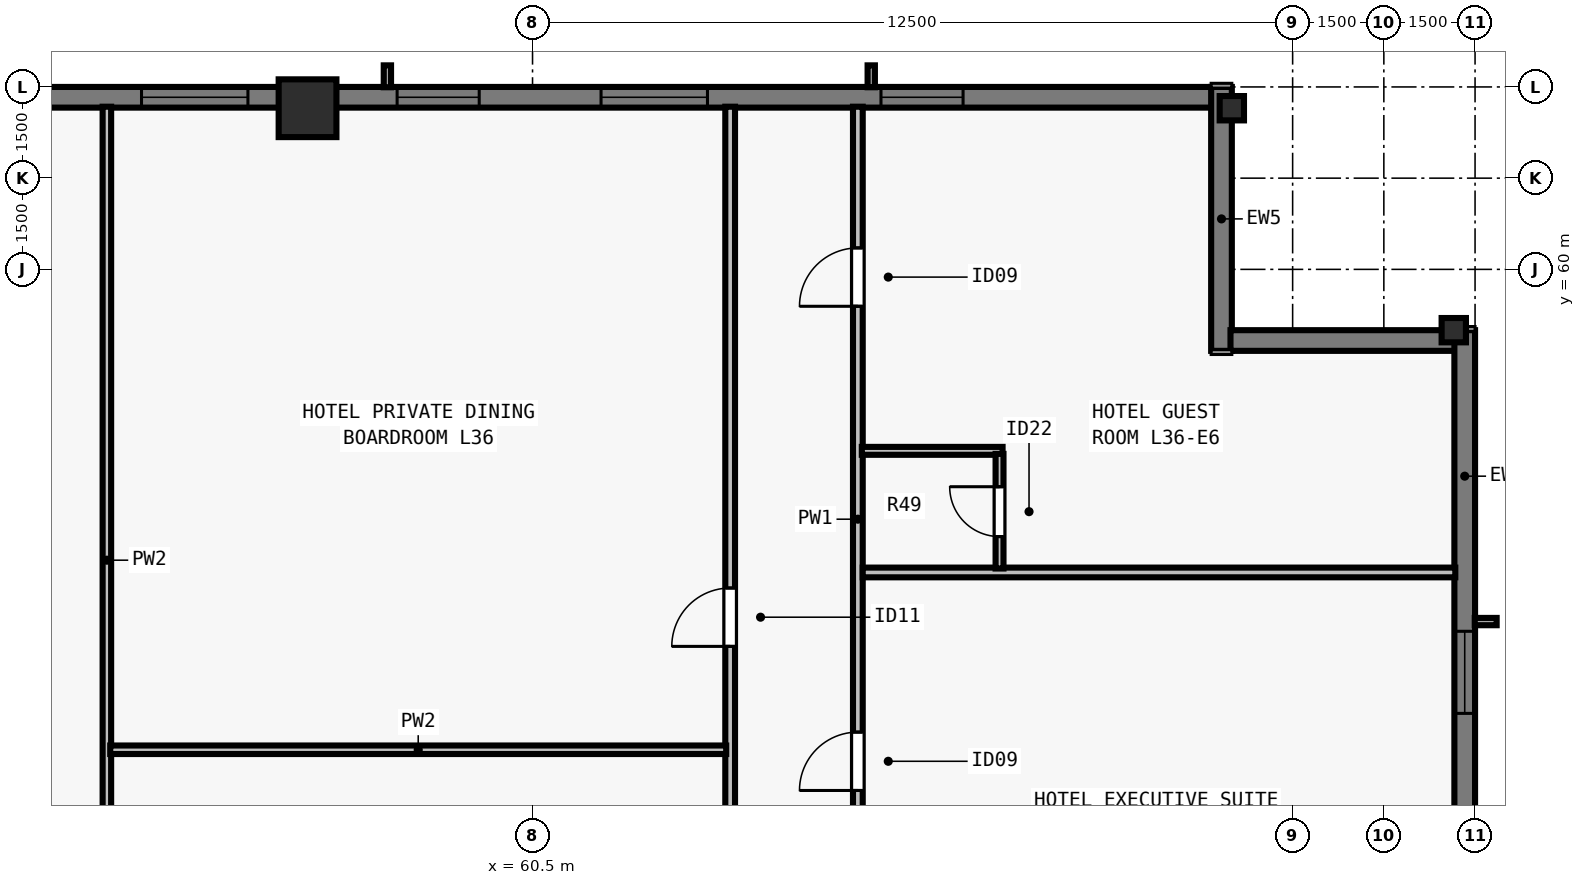
"""IFC4 building model, lengths in metres.
Left out: names, types, materials, properties, quantities, classifications, styles, units other than length and angle.
Written with IfcOpenShell. Run it as: python <this file> out.ifc"""

import sys

from ifc_helpers import new_model, si_unit, direction, frame, frame_2d, origin, origin_2d, place, context, subcontext, project, spatial, rectangle, i_section, extrude, element, fill, save


model = new_model("IFC4")
c1 = context("Model", 3, precision=1e-05, world=origin(), true_north=direction((0.0, 1.0)))
c2 = subcontext(c1, "Body", "Model", "MODEL_VIEW")
j1 = project(units=[si_unit("LENGTHUNIT", "METRE"), si_unit("PLANEANGLEUNIT", "RADIAN")], contexts=[c1])
p1 = place(None, origin())
s1 = spatial("IfcSite", under=j1, at=p1, CompositionType="ELEMENT")
p2 = place(p1, origin())
s2 = spatial("IfcBuilding", under=s1, at=p2, CompositionType="ELEMENT")
p3 = place(p2, frame((0.0, 0.0, 134.0)))
s3 = spatial("IfcBuildingStorey", under=s2, at=p3, CompositionType="ELEMENT", Elevation=134.0)
for number, where, z_axis, x_axis in (
    (1, (75.65, 59.0, 0.0), (0.0, 0.0, 1.0), (0.0, 1.0, 0.0)),
    (2, (72.0, 62.65, 0.0), (0.0, 0.0, 1.0), (1.0, 0.0, 0.0)),
):
    element("IfcColumn", number, at=place(p3, frame(where, z_axis=z_axis, x_axis=x_axis)), inside=s3, PredefinedType="COLUMN", context=c2, shape_type="SweptSolid", body=[
        extrude(i_section(OverallWidth=0.4, OverallDepth=0.4, WebThickness=0.022, FlangeThickness=0.036, at=origin_2d()), origin(), (0.0, 0.0, 1.0), 3.5),
    ])
p4 = place(p3, frame((56.8, 62.65, 0.0), z_axis=(0.0, 0.0, 1.0), x_axis=(1.0, 0.0, 0.0)))
e3 = element("IfcColumn", 3, at=p4, inside=s3, PredefinedType="COLUMN", context=c2, shape_type="SweptSolid", body=[
    extrude(rectangle(XDim=0.95, YDim=0.95, at=origin_2d()), origin(), (0.0, 0.0, 1.0), 3.5),
])
p5 = place(p3, frame((32.0, 62.83, 0.0), z_axis=(0.0, 0.0, 1.0), x_axis=(1.0, 0.0, 0.0)))
e4 = element("IfcWall", 4, at=p5, inside=s3, PredefinedType="SOLIDWALL", context=c2, shape_type="SweptSolid", body=[
    extrude(rectangle(XDim=39.682, YDim=0.34, at=frame_2d((19.841, 0.0))), origin(), (0.0, 0.0, 1.0), 3.28),
])
p6 = place(p5, frame((4.952, 0.0, 0.8)))
e5 = element("IfcOpeningElement", 5, at=p6, cuts=e4, PredefinedType="OPENING", context=c2, shape_type="SweptSolid", body=[
    extrude(rectangle(XDim=1.35, YDim=1.66, at=frame_2d((0.675, 0.83))), frame((0.0, 0.18, 0.0), z_axis=(0.0, -1.0, 0.0), x_axis=(1.0, 0.0, 0.0)), (0.0, 0.0, 1.0), 0.36),
])
p7 = place(p5, frame((12.059, 0.0, 0.8)))
e6 = element("IfcOpeningElement", 6, at=p7, cuts=e4, PredefinedType="OPENING", context=c2, shape_type="SweptSolid", body=[
    extrude(rectangle(XDim=1.35, YDim=1.66, at=frame_2d((0.675, 0.83))), frame((0.0, 0.18, 0.0), z_axis=(0.0, -1.0, 0.0), x_axis=(1.0, 0.0, 0.0)), (0.0, 0.0, 1.0), 0.36),
])
p8 = place(p5, frame((16.262, 0.0, 0.8)))
e7 = element("IfcOpeningElement", 7, at=p8, cuts=e4, PredefinedType="OPENING", context=c2, shape_type="SweptSolid", body=[
    extrude(rectangle(XDim=1.75, YDim=1.66, at=frame_2d((0.875, 0.83))), frame((0.0, 0.18, 0.0), z_axis=(0.0, -1.0, 0.0), x_axis=(1.0, 0.0, 0.0)), (0.0, 0.0, 1.0), 0.36),
])
p9 = place(p5, frame((19.166, 0.0, 0.8)))
e8 = element("IfcOpeningElement", 8, at=p9, cuts=e4, PredefinedType="OPENING", context=c2, shape_type="SweptSolid", body=[
    extrude(rectangle(XDim=1.35, YDim=1.66, at=frame_2d((0.675, 0.83))), frame((0.0, 0.18, 0.0), z_axis=(0.0, -1.0, 0.0), x_axis=(1.0, 0.0, 0.0)), (0.0, 0.0, 1.0), 0.36),
])
p10 = place(p5, frame((22.07, 0.0, 0.8)))
e9 = element("IfcOpeningElement", 9, at=p10, cuts=e4, PredefinedType="OPENING", context=c2, shape_type="SweptSolid", body=[
    extrude(rectangle(XDim=1.75, YDim=1.66, at=frame_2d((0.875, 0.83))), frame((0.0, 0.18, 0.0), z_axis=(0.0, -1.0, 0.0), x_axis=(1.0, 0.0, 0.0)), (0.0, 0.0, 1.0), 0.36),
])
p11 = place(p5, frame((26.273, 0.0, 0.8)))
e10 = element("IfcOpeningElement", 10, at=p11, cuts=e4, PredefinedType="OPENING", context=c2, shape_type="SweptSolid", body=[
    extrude(rectangle(XDim=1.35, YDim=1.66, at=frame_2d((0.675, 0.83))), frame((0.0, 0.18, 0.0), z_axis=(0.0, -1.0, 0.0), x_axis=(1.0, 0.0, 0.0)), (0.0, 0.0, 1.0), 0.36),
])
p12 = place(p5, frame((29.627, 0.0, 0.8)))
e11 = element("IfcOpeningElement", 11, at=p12, cuts=e4, PredefinedType="OPENING", context=c2, shape_type="SweptSolid", body=[
    extrude(rectangle(XDim=1.75, YDim=1.66, at=frame_2d((0.875, 0.83))), frame((0.0, 0.18, 0.0), z_axis=(0.0, -1.0, 0.0), x_axis=(1.0, 0.0, 0.0)), (0.0, 0.0, 1.0), 0.36),
])
p13 = place(p5, frame((34.23, 0.0, 0.8)))
e12 = element("IfcOpeningElement", 12, at=p13, cuts=e4, PredefinedType="OPENING", context=c2, shape_type="SweptSolid", body=[
    extrude(rectangle(XDim=1.35, YDim=1.66, at=frame_2d((0.675, 0.83))), frame((0.0, 0.18, 0.0), z_axis=(0.0, -1.0, 0.0), x_axis=(1.0, 0.0, 0.0)), (0.0, 0.0, 1.0), 0.36),
])
p14 = place(p3, frame((71.83, 63.0, 0.0), z_axis=(0.0, 0.0, 1.0), x_axis=(0.0, -1.0, 0.0)))
e13 = element("IfcWall", 13, at=p14, inside=s3, PredefinedType="SOLIDWALL", context=c2, shape_type="SweptSolid", body=[
    extrude(rectangle(XDim=4.34, YDim=0.34, at=frame_2d((2.17, 0.0))), origin(), (0.0, 0.0, 1.0), 3.28),
])
p15 = place(p3, frame((71.978, 58.83, 0.0), z_axis=(0.0, 0.0, 1.0), x_axis=(1.0, 0.0, 0.0)))
e14 = element("IfcWall", 14, at=p15, inside=s3, PredefinedType="SOLIDWALL", context=c2, shape_type="SweptSolid", body=[
    extrude(rectangle(XDim=3.704, YDim=0.34, at=frame_2d((1.852, 0.0))), origin(), (0.0, 0.0, 1.0), 3.28),
])
p16 = place(p3, frame((75.83, 59.0, 0.0), z_axis=(0.0, 0.0, 1.0), x_axis=(0.0, -1.0, 0.0)))
e15 = element("IfcWall", 15, at=p16, inside=s3, PredefinedType="SOLIDWALL", context=c2, shape_type="SweptSolid", body=[
    extrude(rectangle(XDim=39.682, YDim=0.34, at=frame_2d((19.841, 0.0))), origin(), (0.0, 0.0, 1.0), 3.28),
])
p17 = place(p16, frame((4.952, 0.0, 0.8)))
e16 = element("IfcOpeningElement", 16, at=p17, cuts=e15, PredefinedType="OPENING", context=c2, shape_type="SweptSolid", body=[
    extrude(rectangle(XDim=1.35, YDim=1.66, at=frame_2d((0.675, 0.83))), frame((0.0, 0.18, 0.0), z_axis=(0.0, -1.0, 0.0), x_axis=(1.0, 0.0, 0.0)), (0.0, 0.0, 1.0), 0.36),
])
p18 = place(p16, frame((8.305, 0.0, 0.8)))
e17 = element("IfcOpeningElement", 17, at=p18, cuts=e15, PredefinedType="OPENING", context=c2, shape_type="SweptSolid", body=[
    extrude(rectangle(XDim=1.75, YDim=1.66, at=frame_2d((0.875, 0.83))), frame((0.0, 0.18, 0.0), z_axis=(0.0, -1.0, 0.0), x_axis=(1.0, 0.0, 0.0)), (0.0, 0.0, 1.0), 0.36),
])
p19 = place(p16, frame((12.909, 0.0, 0.8)))
e18 = element("IfcOpeningElement", 18, at=p19, cuts=e15, PredefinedType="OPENING", context=c2, shape_type="SweptSolid", body=[
    extrude(rectangle(XDim=1.35, YDim=1.66, at=frame_2d((0.675, 0.83))), frame((0.0, 0.18, 0.0), z_axis=(0.0, -1.0, 0.0), x_axis=(1.0, 0.0, 0.0)), (0.0, 0.0, 1.0), 0.36),
])
p20 = place(p16, frame((16.262, 0.0, 0.8)))
e19 = element("IfcOpeningElement", 19, at=p20, cuts=e15, PredefinedType="OPENING", context=c2, shape_type="SweptSolid", body=[
    extrude(rectangle(XDim=1.75, YDim=1.66, at=frame_2d((0.875, 0.83))), frame((0.0, 0.18, 0.0), z_axis=(0.0, -1.0, 0.0), x_axis=(1.0, 0.0, 0.0)), (0.0, 0.0, 1.0), 0.36),
])
p21 = place(p16, frame((20.016, 0.0, 0.8)))
e20 = element("IfcOpeningElement", 20, at=p21, cuts=e15, PredefinedType="OPENING", context=c2, shape_type="SweptSolid", body=[
    extrude(rectangle(XDim=1.35, YDim=1.66, at=frame_2d((0.675, 0.83))), frame((0.0, 0.18, 0.0), z_axis=(0.0, -1.0, 0.0), x_axis=(1.0, 0.0, 0.0)), (0.0, 0.0, 1.0), 0.36),
])
p22 = place(p16, frame((22.07, 0.0, 0.8)))
e21 = element("IfcOpeningElement", 21, at=p22, cuts=e15, PredefinedType="OPENING", context=c2, shape_type="SweptSolid", body=[
    extrude(rectangle(XDim=1.75, YDim=1.66, at=frame_2d((0.875, 0.83))), frame((0.0, 0.18, 0.0), z_axis=(0.0, -1.0, 0.0), x_axis=(1.0, 0.0, 0.0)), (0.0, 0.0, 1.0), 0.36),
])
p23 = place(p16, frame((26.273, 0.0, 0.8)))
e22 = element("IfcOpeningElement", 22, at=p23, cuts=e15, PredefinedType="OPENING", context=c2, shape_type="SweptSolid", body=[
    extrude(rectangle(XDim=1.35, YDim=1.66, at=frame_2d((0.675, 0.83))), frame((0.0, 0.18, 0.0), z_axis=(0.0, -1.0, 0.0), x_axis=(1.0, 0.0, 0.0)), (0.0, 0.0, 1.0), 0.36),
])
p24 = place(p16, frame((29.627, 0.0, 0.8)))
e23 = element("IfcOpeningElement", 23, at=p24, cuts=e15, PredefinedType="OPENING", context=c2, shape_type="SweptSolid", body=[
    extrude(rectangle(XDim=1.75, YDim=1.66, at=frame_2d((0.875, 0.83))), frame((0.0, 0.18, 0.0), z_axis=(0.0, -1.0, 0.0), x_axis=(1.0, 0.0, 0.0)), (0.0, 0.0, 1.0), 0.36),
])
p25 = place(p16, frame((33.38, 0.0, 0.8)))
e24 = element("IfcOpeningElement", 24, at=p25, cuts=e15, PredefinedType="OPENING", context=c2, shape_type="SweptSolid", body=[
    extrude(rectangle(XDim=1.35, YDim=1.66, at=frame_2d((0.675, 0.83))), frame((0.0, 0.18, 0.0), z_axis=(0.0, -1.0, 0.0), x_axis=(1.0, 0.0, 0.0)), (0.0, 0.0, 1.0), 0.36),
])
p26 = place(p16, frame((35.83, 0.0, 0.8)))
e25 = element("IfcOpeningElement", 25, at=p26, cuts=e15, PredefinedType="OPENING", context=c2, shape_type="SweptSolid", body=[
    extrude(rectangle(XDim=0.9, YDim=1.66, at=frame_2d((0.45, 0.83))), frame((0.0, 0.18, 0.0), z_axis=(0.0, -1.0, 0.0), x_axis=(1.0, 0.0, 0.0)), (0.0, 0.0, 1.0), 0.36),
])
p27 = place(p3, frame((65.85, 15.325, 0.0), z_axis=(0.0, 0.0, 1.0), x_axis=(0.0, 1.0, 0.0)))
e26 = element("IfcWall", 26, at=p27, inside=s3, PredefinedType="PARTITIONING", context=c2, shape_type="SweptSolid", body=[
    extrude(rectangle(XDim=47.35, YDim=0.16, at=frame_2d((23.675, 0.0))), origin(), (0.0, 0.0, 1.0), 2.555),
])
p28 = place(p27, frame((4.993, 0.0, 0.0)))
e27 = element("IfcOpeningElement", 27, at=p28, cuts=e26, PredefinedType="OPENING", context=c2, shape_type="SweptSolid", body=[
    extrude(rectangle(XDim=0.96, YDim=2.15, at=frame_2d((0.48, 1.075))), frame((0.0, 0.09, 0.0), z_axis=(0.0, -1.0, 0.0), x_axis=(1.0, 0.0, 0.0)), (0.0, 0.0, 1.0), 0.18),
])
p29 = place(p27, frame((12.525, 0.0, 0.0)))
e28 = element("IfcOpeningElement", 28, at=p29, cuts=e26, PredefinedType="OPENING", context=c2, shape_type="SweptSolid", body=[
    extrude(rectangle(XDim=0.96, YDim=2.15, at=frame_2d((0.48, 1.075))), frame((0.0, 0.09, 0.0), z_axis=(0.0, -1.0, 0.0), x_axis=(1.0, 0.0, 0.0)), (0.0, 0.0, 1.0), 0.18),
])
p30 = place(p27, frame((20.385, 0.0, 0.0)))
e29 = element("IfcOpeningElement", 29, at=p30, cuts=e26, PredefinedType="OPENING", context=c2, shape_type="SweptSolid", body=[
    extrude(rectangle(XDim=0.96, YDim=2.15, at=frame_2d((0.48, 1.075))), frame((0.0, 0.09, 0.0), z_axis=(0.0, -1.0, 0.0), x_axis=(1.0, 0.0, 0.0)), (0.0, 0.0, 1.0), 0.18),
])
p31 = place(p27, frame((28.246, 0.0, 0.0)))
e30 = element("IfcOpeningElement", 30, at=p31, cuts=e26, PredefinedType="OPENING", context=c2, shape_type="SweptSolid", body=[
    extrude(rectangle(XDim=0.96, YDim=2.15, at=frame_2d((0.48, 1.075))), frame((0.0, 0.09, 0.0), z_axis=(0.0, -1.0, 0.0), x_axis=(1.0, 0.0, 0.0)), (0.0, 0.0, 1.0), 0.18),
])
p32 = place(p27, frame((36.105, 0.0, 0.0)))
e31 = element("IfcOpeningElement", 31, at=p32, cuts=e26, PredefinedType="OPENING", context=c2, shape_type="SweptSolid", body=[
    extrude(rectangle(XDim=0.96, YDim=2.15, at=frame_2d((0.48, 1.075))), frame((0.0, 0.09, 0.0), z_axis=(0.0, -1.0, 0.0), x_axis=(1.0, 0.0, 0.0)), (0.0, 0.0, 1.0), 0.18),
])
p33 = place(p27, frame((44.068, 0.0, 0.0)))
e32 = element("IfcOpeningElement", 32, at=p33, cuts=e26, PredefinedType="OPENING", context=c2, shape_type="SweptSolid", body=[
    extrude(rectangle(XDim=0.96, YDim=2.15, at=frame_2d((0.48, 1.075))), frame((0.0, 0.09, 0.0), z_axis=(0.0, -1.0, 0.0), x_axis=(1.0, 0.0, 0.0)), (0.0, 0.0, 1.0), 0.18),
])
p34 = place(p3, frame((63.75, 47.6, 0.0), z_axis=(0.0, 0.0, 1.0), x_axis=(0.0, 1.0, 0.0)))
e33 = element("IfcWall", 33, at=p34, inside=s3, PredefinedType="PARTITIONING", context=c2, shape_type="SweptSolid", body=[
    extrude(rectangle(XDim=15.075, YDim=0.16, at=frame_2d((7.538, 0.0))), origin(), (0.0, 0.0, 1.0), 2.555),
])
p35 = place(p34, frame((1.6, 0.0, 0.0)))
e34 = element("IfcOpeningElement", 34, at=p35, cuts=e33, PredefinedType="OPENING", context=c2, shape_type="SweptSolid", body=[
    extrude(rectangle(XDim=0.92, YDim=2.12, at=frame_2d((0.46, 1.06))), frame((0.0, 0.09, 0.0), z_axis=(0.0, -1.0, 0.0), x_axis=(1.0, 0.0, 0.0)), (0.0, 0.0, 1.0), 0.18),
])
p36 = place(p34, frame((6.2, 0.0, 0.0)))
e35 = element("IfcOpeningElement", 35, at=p36, cuts=e33, PredefinedType="OPENING", context=c2, shape_type="SweptSolid", body=[
    extrude(rectangle(XDim=0.96, YDim=2.12, at=frame_2d((0.48, 1.06))), frame((0.0, 0.09, 0.0), z_axis=(0.0, -1.0, 0.0), x_axis=(1.0, 0.0, 0.0)), (0.0, 0.0, 1.0), 0.18),
])
p37 = place(p3, frame((53.5, 47.76, 0.0), z_axis=(0.0, 0.0, 1.0), x_axis=(0.0, 1.0, 0.0)))
e36 = element("IfcWall", 36, at=p37, inside=s3, PredefinedType="PARTITIONING", context=c2, shape_type="SweptSolid", body=[
    extrude(rectangle(XDim=14.915, YDim=0.14, at=frame_2d((7.458, 0.0))), origin(), (0.0, 0.0, 1.0), 2.896),
])
p38 = place(p3, frame((53.555, 52.1, 0.0), z_axis=(0.0, 0.0, 1.0), x_axis=(1.0, 0.0, 0.0)))
e37 = element("IfcWall", 37, at=p38, inside=s3, PredefinedType="PARTITIONING", context=c2, shape_type="SweptSolid", body=[
    extrude(rectangle(XDim=10.13, YDim=0.14, at=frame_2d((5.065, 0.0))), origin(), (0.0, 0.0, 1.0), 3.28),
])
p39 = place(p3, frame((65.93, 55.016, 0.0), z_axis=(0.0, 0.0, 1.0), x_axis=(1.0, 0.0, 0.0)))
e38 = element("IfcWall", 38, at=p39, inside=s3, PredefinedType="PARTITIONING", context=c2, shape_type="SweptSolid", body=[
    extrude(rectangle(XDim=9.745, YDim=0.16, at=frame_2d((4.873, 0.0))), origin(), (0.0, 0.0, 1.0), 2.896),
])
p40 = place(p3, frame((65.915, 57.016, 0.0), z_axis=(0.0, 0.0, 1.0), x_axis=(1.0, 0.0, 0.0)))
e39 = element("IfcWall", 39, at=p40, inside=s3, PredefinedType="PLUMBINGWALL", context=c2, shape_type="SweptSolid", body=[
    extrude(rectangle(XDim=2.315, YDim=0.13, at=frame_2d((1.157, 0.0))), origin(), (0.0, 0.0, 1.0), 3.28),
])
p41 = place(p3, frame((68.18, 55.081, 0.0), z_axis=(0.0, 0.0, 1.0), x_axis=(0.0, 1.0, 0.0)))
e40 = element("IfcWall", 40, at=p41, inside=s3, PredefinedType="PLUMBINGWALL", context=c2, shape_type="SweptSolid", body=[
    extrude(rectangle(XDim=1.885, YDim=0.13, at=frame_2d((0.942, 0.0))), origin(), (0.0, 0.0, 1.0), 3.28),
])
p42 = place(p41, frame((0.525, 0.0, 0.0)))
e41 = element("IfcOpeningElement", 41, at=p42, cuts=e40, PredefinedType="OPENING", context=c2, shape_type="SweptSolid", body=[
    extrude(rectangle(XDim=0.82, YDim=2.1, at=frame_2d((0.41, 1.05))), frame((0.0, 0.075, 0.0), z_axis=(0.0, -1.0, 0.0), x_axis=(1.0, 0.0, 0.0)), (0.0, 0.0, 1.0), 0.15),
])
p43 = place(p10, origin())
e42 = element("IfcWindow", 42, at=p43, inside=s3, PartitioningType="SINGLE_PANEL", PredefinedType="WINDOW", context=c2, shape_type="SweptSolid", body=[
    extrude(rectangle(XDim=1.75, YDim=1.66, at=frame_2d((0.875, 0.83))), frame((0.0, -0.05, 0.0), z_axis=(0.0, -1.0, 0.0), x_axis=(1.0, 0.0, 0.0)), (0.0, 0.0, 1.0), 0.06),
])
fill(e9, e42)
p44 = place(p11, origin())
e43 = element("IfcWindow", 43, at=p44, inside=s3, PartitioningType="SINGLE_PANEL", PredefinedType="WINDOW", context=c2, shape_type="SweptSolid", body=[
    extrude(rectangle(XDim=1.35, YDim=1.66, at=frame_2d((0.675, 0.83))), frame((0.0, -0.05, 0.0), z_axis=(0.0, -1.0, 0.0), x_axis=(1.0, 0.0, 0.0)), (0.0, 0.0, 1.0), 0.06),
])
fill(e10, e43)
p45 = place(p12, origin())
e44 = element("IfcWindow", 44, at=p45, inside=s3, PartitioningType="SINGLE_PANEL", PredefinedType="WINDOW", context=c2, shape_type="SweptSolid", body=[
    extrude(rectangle(XDim=1.75, YDim=1.66, at=frame_2d((0.875, 0.83))), frame((0.0, -0.05, 0.0), z_axis=(0.0, -1.0, 0.0), x_axis=(1.0, 0.0, 0.0)), (0.0, 0.0, 1.0), 0.06),
])
fill(e11, e44)
p46 = place(p13, origin())
e45 = element("IfcWindow", 45, at=p46, inside=s3, PartitioningType="SINGLE_PANEL", PredefinedType="WINDOW", context=c2, shape_type="SweptSolid", body=[
    extrude(rectangle(XDim=1.35, YDim=1.66, at=frame_2d((0.675, 0.83))), frame((0.0, -0.05, 0.0), z_axis=(0.0, -1.0, 0.0), x_axis=(1.0, 0.0, 0.0)), (0.0, 0.0, 1.0), 0.06),
])
fill(e12, e45)
p47 = place(p17, origin())
e46 = element("IfcWindow", 46, at=p47, inside=s3, PartitioningType="SINGLE_PANEL", PredefinedType="WINDOW", context=c2, shape_type="SweptSolid", body=[
    extrude(rectangle(XDim=1.35, YDim=1.66, at=frame_2d((0.675, 0.83))), frame((0.0, -0.05, 0.0), z_axis=(0.0, -1.0, 0.0), x_axis=(1.0, 0.0, 0.0)), (0.0, 0.0, 1.0), 0.06),
])
fill(e16, e46)
p48 = place(p36, origin())
e47 = element("IfcDoor", 47, at=p48, inside=s3, OperationType="SINGLE_SWING_LEFT", PredefinedType="DOOR", context=c2, shape_type="SweptSolid", body=[
    extrude(rectangle(XDim=0.96, YDim=2.12, at=frame_2d((0.48, 1.06))), frame((0.0, 0.025, 0.0), z_axis=(0.0, -1.0, 0.0), x_axis=(1.0, 0.0, 0.0)), (0.0, 0.0, 1.0), 0.05),
])
fill(e35, e47)
p49 = place(p32, origin())
e48 = element("IfcDoor", 48, at=p49, inside=s3, OperationType="SINGLE_SWING_LEFT", PredefinedType="DOOR", context=c2, shape_type="SweptSolid", body=[
    extrude(rectangle(XDim=0.96, YDim=2.15, at=frame_2d((0.48, 1.075))), frame((0.0, 0.025, 0.0), z_axis=(0.0, -1.0, 0.0), x_axis=(1.0, 0.0, 0.0)), (0.0, 0.0, 1.0), 0.05),
])
fill(e31, e48)
p50 = place(p42, origin())
e49 = element("IfcDoor", 49, at=p50, inside=s3, OperationType="SINGLE_SWING_RIGHT", PredefinedType="DOOR", context=c2, shape_type="SweptSolid", body=[
    extrude(rectangle(XDim=0.82, YDim=2.1, at=frame_2d((0.41, 1.05))), frame((0.0, 0.025, 0.0), z_axis=(0.0, -1.0, 0.0), x_axis=(1.0, 0.0, 0.0)), (0.0, 0.0, 1.0), 0.05),
])
fill(e41, e49)
p51 = place(p33, origin())
e50 = element("IfcDoor", 50, at=p51, inside=s3, OperationType="SINGLE_SWING_LEFT", PredefinedType="DOOR", context=c2, shape_type="SweptSolid", body=[
    extrude(rectangle(XDim=0.96, YDim=2.15, at=frame_2d((0.48, 1.075))), frame((0.0, 0.025, 0.0), z_axis=(0.0, -1.0, 0.0), x_axis=(1.0, 0.0, 0.0)), (0.0, 0.0, 1.0), 0.05),
])
fill(e32, e50)
save(model, sys.argv[1])
